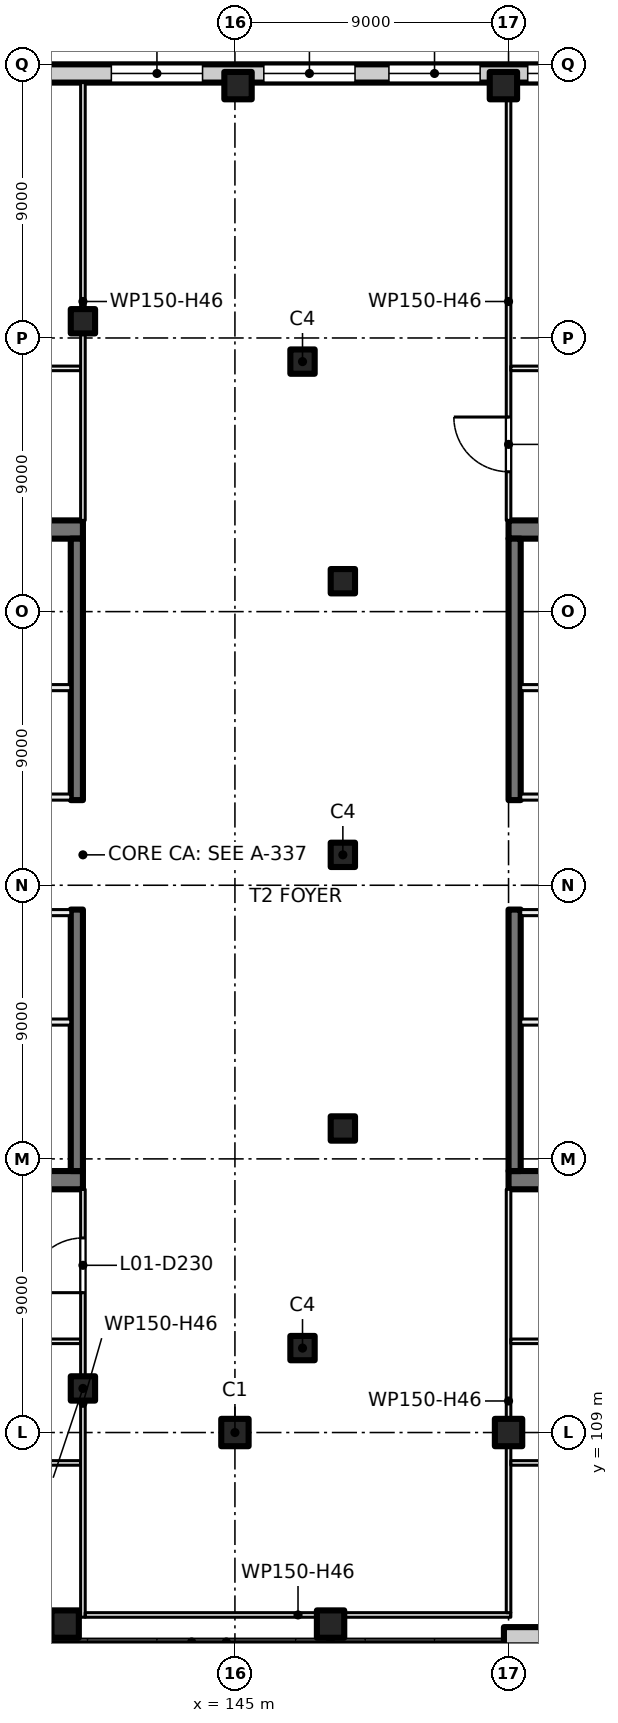
"""IFC4 building model, lengths in metres.
Left out: names, types, materials, properties, quantities, classifications, styles, units other than length and angle.
Written with IfcOpenShell. Run it as: python <this file> out.ifc"""

import sys

from ifc_helpers import new_model, si_unit, direction, frame, frame_2d, origin, origin_2d, place, context, subcontext, project, spatial, rectangle, extrude, element, fill, save


model = new_model("IFC4")
c1 = context("Model", 3, precision=1e-05, world=origin(), true_north=direction((0.0, 1.0)))
c2 = subcontext(c1, "Body", "Model", "MODEL_VIEW")
j1 = project(units=[si_unit("LENGTHUNIT", "METRE"), si_unit("PLANEANGLEUNIT", "RADIAN")], contexts=[c1])
p1 = place(None, origin())
s1 = spatial("IfcSite", under=j1, at=p1, CompositionType="ELEMENT")
p2 = place(p1, origin())
s2 = spatial("IfcBuilding", under=s1, at=p2, CompositionType="ELEMENT")
p3 = place(p2, frame((0.0, 0.0, 7.5)))
s3 = spatial("IfcBuildingStorey", under=s2, at=p3, CompositionType="ELEMENT", Elevation=7.5)
for number, where, z_axis, x_axis in (
    (1, (145.0, 109.0, 0.0), (0.0, 0.0, 1.0), (1.0, 0.0, 0.0)),
    (2, (154.0, 109.0, 0.0), (0.0, 0.0, 1.0), (1.0, 0.0, 0.0)),
    (3, (145.102, 153.3, 0.0), (0.0, 0.0, 1.0), (1.0, 0.0, 0.0)),
    (4, (153.831, 153.3, 0.0), (0.0, 0.0, 1.0), (1.0, 0.0, 0.0)),
    (5, (148.146, 102.7, 0.0), (0.0, 0.0, 1.0), (1.0, 0.0, 0.0)),
    (6, (139.416, 102.7, 0.0), (0.0, 0.0, 1.0), (1.0, 0.0, 0.0)),
):
    element("IfcColumn", number, at=place(p3, frame(where, z_axis=z_axis, x_axis=x_axis)), inside=s3, PredefinedType="COLUMN", context=c2, shape_type="SweptSolid", body=[
        extrude(rectangle(XDim=0.9, YDim=0.9, at=origin_2d()), origin(), (0.0, 0.0, 1.0), 5.0),
    ])
for number, where, z_axis, x_axis in (
    (7, (148.55, 119.0, 0.0), (0.0, 0.0, 1.0), (1.0, 0.0, 0.0)),
    (8, (148.55, 128.0, 0.0), (0.0, 0.0, 1.0), (1.0, 0.0, 0.0)),
    (9, (148.55, 137.0, 0.0), (0.0, 0.0, 1.0), (1.0, 0.0, 0.0)),
    (10, (140.0, 145.55, 0.0), (0.0, 0.0, 1.0), (1.0, 0.0, 0.0)),
    (11, (147.223, 144.223, 0.0), (0.0, 0.0, 1.0), (1.0, 0.0, 0.0)),
    (12, (140.0, 110.45, 0.0), (0.0, 0.0, 1.0), (1.0, 0.0, 0.0)),
    (13, (147.223, 111.777, 0.0), (0.0, 0.0, 1.0), (1.0, 0.0, 0.0)),
):
    element("IfcColumn", number, at=place(p3, frame(where, z_axis=z_axis, x_axis=x_axis)), inside=s3, PredefinedType="COLUMN", context=c2, shape_type="SweptSolid", body=[
        extrude(rectangle(XDim=0.8, YDim=0.8, at=origin_2d()), origin(), (0.0, 0.0, 1.0), 5.0),
    ])
for number, where, z_axis, x_axis in (
    (14, (135.4, 117.3, 0.0), (0.0, 0.0, 1.0), (1.0, 0.0, 0.0)),
    (15, (135.4, 138.7, 0.0), (0.0, 0.0, 1.0), (1.0, 0.0, 0.0)),
):
    element("IfcWall", number, at=place(p3, frame(where, z_axis=z_axis, x_axis=x_axis)), inside=s3, PredefinedType="SHEAR", context=c2, shape_type="SweptSolid", body=[
        extrude(rectangle(XDim=4.6, YDim=0.6, at=frame_2d((2.3, 0.0))), origin(), (0.0, 0.0, 1.0), 5.0),
    ])
for number, where, z_axis, x_axis in (
    (16, (139.8, 117.6, 0.0), (0.0, 0.0, 1.0), (0.0, 1.0, 0.0)),
    (17, (139.8, 129.8, 0.0), (0.0, 0.0, 1.0), (0.0, 1.0, 0.0)),
):
    element("IfcWall", number, at=place(p3, frame(where, z_axis=z_axis, x_axis=x_axis)), inside=s3, PredefinedType="SHEAR", context=c2, shape_type="SweptSolid", body=[
        extrude(rectangle(XDim=8.6, YDim=0.4, at=frame_2d((4.3, 0.0))), origin(), (0.0, 0.0, 1.0), 5.0),
    ])
for number, where, z_axis, x_axis in (
    (18, (158.6, 138.7, 0.0), (0.0, 0.0, 1.0), (-1.0, 0.0, 0.0)),
    (19, (158.6, 117.3, 0.0), (0.0, 0.0, 1.0), (-1.0, 0.0, 0.0)),
):
    element("IfcWall", number, at=place(p3, frame(where, z_axis=z_axis, x_axis=x_axis)), inside=s3, PredefinedType="SHEAR", context=c2, shape_type="SweptSolid", body=[
        extrude(rectangle(XDim=4.6, YDim=0.6, at=frame_2d((2.3, 0.0))), origin(), (0.0, 0.0, 1.0), 5.0),
    ])
for number, where, z_axis, x_axis in (
    (20, (154.2, 138.4, 0.0), (0.0, 0.0, 1.0), (0.0, -1.0, 0.0)),
    (21, (154.2, 126.2, 0.0), (0.0, 0.0, 1.0), (0.0, -1.0, 0.0)),
):
    element("IfcWall", number, at=place(p3, frame(where, z_axis=z_axis, x_axis=x_axis)), inside=s3, PredefinedType="SHEAR", context=c2, shape_type="SweptSolid", body=[
        extrude(rectangle(XDim=8.6, YDim=0.4, at=frame_2d((4.3, 0.0))), origin(), (0.0, 0.0, 1.0), 5.0),
    ])
p4 = place(p3, frame((162.978, 102.3, 0.0), z_axis=(0.0, 0.0, 1.0), x_axis=(-1.0, 0.0, 0.0)))
e22 = element("IfcWall", 22, at=p4, inside=s3, PredefinedType="SOLIDWALL", context=c2, shape_type="SweptSolid", body=[
    extrude(rectangle(XDim=9.13, YDim=0.6, at=frame_2d((4.565, 0.0))), origin(), (0.0, 0.0, 1.0), 4.6),
])
p5 = place(p4, frame((0.783, 0.0, 0.9)))
e23 = element("IfcOpeningElement", 23, at=p5, cuts=e22, PredefinedType="OPENING", context=c2, shape_type="SweptSolid", body=[
    extrude(rectangle(XDim=3.0, YDim=3.0, at=frame_2d((1.5, 1.5))), frame((0.0, 0.31, 0.0), z_axis=(0.0, -1.0, 0.0), x_axis=(1.0, 0.0, 0.0)), (0.0, 0.0, 1.0), 0.62),
])
p6 = place(p3, frame((131.022, 153.7, 0.0), z_axis=(0.0, 0.0, 1.0), x_axis=(1.0, 0.0, 0.0)))
e24 = element("IfcWall", 24, at=p6, inside=s3, PredefinedType="SOLIDWALL", context=c2, shape_type="SweptSolid", body=[
    extrude(rectangle(XDim=31.957, YDim=0.6, at=frame_2d((15.978, 0.0))), origin(), (0.0, 0.0, 1.0), 4.6),
])
p7 = place(p6, frame((0.783, 0.0, 0.9)))
e25 = element("IfcOpeningElement", 25, at=p7, cuts=e24, PredefinedType="OPENING", context=c2, shape_type="SweptSolid", body=[
    extrude(rectangle(XDim=3.0, YDim=3.0, at=frame_2d((1.5, 1.5))), frame((0.0, 0.31, 0.0), z_axis=(0.0, -1.0, 0.0), x_axis=(1.0, 0.0, 0.0)), (0.0, 0.0, 1.0), 0.62),
])
p8 = place(p6, frame((9.913, 0.0, 0.9)))
e26 = element("IfcOpeningElement", 26, at=p8, cuts=e24, PredefinedType="OPENING", context=c2, shape_type="SweptSolid", body=[
    extrude(rectangle(XDim=3.0, YDim=3.0, at=frame_2d((1.5, 1.5))), frame((0.0, 0.31, 0.0), z_axis=(0.0, -1.0, 0.0), x_axis=(1.0, 0.0, 0.0)), (0.0, 0.0, 1.0), 0.62),
])
p9 = place(p6, frame((14.928, 0.0, 0.9)))
e27 = element("IfcOpeningElement", 27, at=p9, cuts=e24, PredefinedType="OPENING", context=c2, shape_type="SweptSolid", body=[
    extrude(rectangle(XDim=3.0, YDim=3.0, at=frame_2d((1.5, 1.5))), frame((0.0, 0.31, 0.0), z_axis=(0.0, -1.0, 0.0), x_axis=(1.0, 0.0, 0.0)), (0.0, 0.0, 1.0), 0.62),
])
p10 = place(p6, frame((19.043, 0.0, 0.9)))
e28 = element("IfcOpeningElement", 28, at=p10, cuts=e24, PredefinedType="OPENING", context=c2, shape_type="SweptSolid", body=[
    extrude(rectangle(XDim=3.0, YDim=3.0, at=frame_2d((1.5, 1.5))), frame((0.0, 0.31, 0.0), z_axis=(0.0, -1.0, 0.0), x_axis=(1.0, 0.0, 0.0)), (0.0, 0.0, 1.0), 0.62),
])
p11 = place(p6, frame((23.609, 0.0, 0.9)))
e29 = element("IfcOpeningElement", 29, at=p11, cuts=e24, PredefinedType="OPENING", context=c2, shape_type="SweptSolid", body=[
    extrude(rectangle(XDim=3.0, YDim=3.0, at=frame_2d((1.5, 1.5))), frame((0.0, 0.31, 0.0), z_axis=(0.0, -1.0, 0.0), x_axis=(1.0, 0.0, 0.0)), (0.0, 0.0, 1.0), 0.62),
])
p12 = place(p6, frame((27.724, 0.0, 0.9)))
e30 = element("IfcOpeningElement", 30, at=p12, cuts=e24, PredefinedType="OPENING", context=c2, shape_type="SweptSolid", body=[
    extrude(rectangle(XDim=3.0, YDim=3.0, at=frame_2d((1.5, 1.5))), frame((0.0, 0.31, 0.0), z_axis=(0.0, -1.0, 0.0), x_axis=(1.0, 0.0, 0.0)), (0.0, 0.0, 1.0), 0.62),
])
p13 = place(p3, frame((135.0, 129.9, 0.0), z_axis=(0.0, 0.0, 1.0), x_axis=(1.0, 0.0, 0.0)))
e31 = element("IfcWall", 31, at=p13, inside=s3, PredefinedType="PARTITIONING", context=c2, shape_type="SweptSolid", body=[
    extrude(rectangle(XDim=4.6, YDim=0.2, at=frame_2d((2.3, 0.0))), origin(), (0.0, 0.0, 1.0), 4.6),
])
p14 = place(p13, frame((1.7, 0.0, 0.0)))
e32 = element("IfcOpeningElement", 32, at=p14, cuts=e31, PredefinedType="OPENING", context=c2, shape_type="SweptSolid", body=[
    extrude(rectangle(XDim=1.2, YDim=2.1, at=frame_2d((0.6, 1.05))), frame((0.0, 0.11, 0.0), z_axis=(0.0, -1.0, 0.0), x_axis=(1.0, 0.0, 0.0)), (0.0, 0.0, 1.0), 0.22),
])
p15 = place(p3, frame((135.0, 133.5, 0.0), z_axis=(0.0, 0.0, 1.0), x_axis=(1.0, 0.0, 0.0)))
e33 = element("IfcWall", 33, at=p15, inside=s3, PredefinedType="PARTITIONING", context=c2, shape_type="SweptSolid", body=[
    extrude(rectangle(XDim=4.6, YDim=0.2, at=frame_2d((2.3, 0.0))), origin(), (0.0, 0.0, 1.0), 4.6),
])
p16 = place(p15, frame((1.75, 0.0, 0.0)))
e34 = element("IfcOpeningElement", 34, at=p16, cuts=e33, PredefinedType="OPENING", context=c2, shape_type="SweptSolid", body=[
    extrude(rectangle(XDim=1.5, YDim=2.1, at=frame_2d((0.75, 1.05))), frame((0.0, 0.11, 0.0), z_axis=(0.0, -1.0, 0.0), x_axis=(1.0, 0.0, 0.0)), (0.0, 0.0, 1.0), 0.22),
])
p17 = place(p3, frame((139.6, 126.1, 0.0), z_axis=(0.0, 0.0, 1.0), x_axis=(-1.0, 0.0, 0.0)))
e35 = element("IfcWall", 35, at=p17, inside=s3, PredefinedType="PARTITIONING", context=c2, shape_type="SweptSolid", body=[
    extrude(rectangle(XDim=4.6, YDim=0.2, at=frame_2d((2.3, 0.0))), origin(), (0.0, 0.0, 1.0), 4.6),
])
p18 = place(p17, frame((1.7, 0.0, 0.0)))
e36 = element("IfcOpeningElement", 36, at=p18, cuts=e35, PredefinedType="OPENING", context=c2, shape_type="SweptSolid", body=[
    extrude(rectangle(XDim=1.2, YDim=2.1, at=frame_2d((0.6, 1.05))), frame((0.0, 0.11, 0.0), z_axis=(0.0, -1.0, 0.0), x_axis=(1.0, 0.0, 0.0)), (0.0, 0.0, 1.0), 0.22),
])
p19 = place(p3, frame((139.6, 122.5, 0.0), z_axis=(0.0, 0.0, 1.0), x_axis=(-1.0, 0.0, 0.0)))
e37 = element("IfcWall", 37, at=p19, inside=s3, PredefinedType="PARTITIONING", context=c2, shape_type="SweptSolid", body=[
    extrude(rectangle(XDim=4.6, YDim=0.2, at=frame_2d((2.3, 0.0))), origin(), (0.0, 0.0, 1.0), 4.6),
])
p20 = place(p19, frame((1.35, 0.0, 0.0)))
e38 = element("IfcOpeningElement", 38, at=p20, cuts=e37, PredefinedType="OPENING", context=c2, shape_type="SweptSolid", body=[
    extrude(rectangle(XDim=1.5, YDim=2.1, at=frame_2d((0.75, 1.05))), frame((0.0, 0.11, 0.0), z_axis=(0.0, -1.0, 0.0), x_axis=(1.0, 0.0, 0.0)), (0.0, 0.0, 1.0), 0.22),
])
p21 = place(p3, frame((163.8, 126.1, 0.0), z_axis=(0.0, 0.0, 1.0), x_axis=(-1.0, 0.0, 0.0)))
e39 = element("IfcWall", 39, at=p21, inside=s3, PredefinedType="PARTITIONING", context=c2, shape_type="SweptSolid", body=[
    extrude(rectangle(XDim=9.4, YDim=0.2, at=frame_2d((4.7, 0.0))), origin(), (0.0, 0.0, 1.0), 4.6),
])
p22 = place(p21, frame((4.1, 0.0, 0.0)))
e40 = element("IfcOpeningElement", 40, at=p22, cuts=e39, PredefinedType="OPENING", context=c2, shape_type="SweptSolid", body=[
    extrude(rectangle(XDim=1.2, YDim=2.1, at=frame_2d((0.6, 1.05))), frame((0.0, 0.11, 0.0), z_axis=(0.0, -1.0, 0.0), x_axis=(1.0, 0.0, 0.0)), (0.0, 0.0, 1.0), 0.22),
])
p23 = place(p3, frame((163.8, 122.5, 0.0), z_axis=(0.0, 0.0, 1.0), x_axis=(-1.0, 0.0, 0.0)))
e41 = element("IfcWall", 41, at=p23, inside=s3, PredefinedType="PARTITIONING", context=c2, shape_type="SweptSolid", body=[
    extrude(rectangle(XDim=9.4, YDim=0.2, at=frame_2d((4.7, 0.0))), origin(), (0.0, 0.0, 1.0), 4.6),
])
p24 = place(p23, frame((6.55, 0.0, 0.0)))
e42 = element("IfcOpeningElement", 42, at=p24, cuts=e41, PredefinedType="OPENING", context=c2, shape_type="SweptSolid", body=[
    extrude(rectangle(XDim=1.5, YDim=2.1, at=frame_2d((0.75, 1.05))), frame((0.0, 0.11, 0.0), z_axis=(0.0, -1.0, 0.0), x_axis=(1.0, 0.0, 0.0)), (0.0, 0.0, 1.0), 0.22),
])
p25 = place(p3, frame((154.4, 129.9, 0.0), z_axis=(0.0, 0.0, 1.0), x_axis=(1.0, 0.0, 0.0)))
e43 = element("IfcWall", 43, at=p25, inside=s3, PredefinedType="PARTITIONING", context=c2, shape_type="SweptSolid", body=[
    extrude(rectangle(XDim=9.4, YDim=0.2, at=frame_2d((4.7, 0.0))), origin(), (0.0, 0.0, 1.0), 4.6),
])
p26 = place(p25, frame((4.1, 0.0, 0.0)))
e44 = element("IfcOpeningElement", 44, at=p26, cuts=e43, PredefinedType="OPENING", context=c2, shape_type="SweptSolid", body=[
    extrude(rectangle(XDim=1.2, YDim=2.1, at=frame_2d((0.6, 1.05))), frame((0.0, 0.11, 0.0), z_axis=(0.0, -1.0, 0.0), x_axis=(1.0, 0.0, 0.0)), (0.0, 0.0, 1.0), 0.22),
])
p27 = place(p3, frame((154.4, 133.5, 0.0), z_axis=(0.0, 0.0, 1.0), x_axis=(1.0, 0.0, 0.0)))
e45 = element("IfcWall", 45, at=p27, inside=s3, PredefinedType="PARTITIONING", context=c2, shape_type="SweptSolid", body=[
    extrude(rectangle(XDim=9.4, YDim=0.2, at=frame_2d((4.7, 0.0))), origin(), (0.0, 0.0, 1.0), 4.6),
])
p28 = place(p27, frame((1.35, 0.0, 0.0)))
e46 = element("IfcOpeningElement", 46, at=p28, cuts=e45, PredefinedType="OPENING", context=c2, shape_type="SweptSolid", body=[
    extrude(rectangle(XDim=1.5, YDim=2.1, at=frame_2d((0.75, 1.05))), frame((0.0, 0.11, 0.0), z_axis=(0.0, -1.0, 0.0), x_axis=(1.0, 0.0, 0.0)), (0.0, 0.0, 1.0), 0.22),
])
p29 = place(p3, frame((119.875, 144.0, 0.0), z_axis=(0.0, 0.0, 1.0), x_axis=(1.0, 0.0, 0.0)))
e47 = element("IfcWall", 47, at=p29, inside=s3, PredefinedType="PARTITIONING", context=c2, shape_type="SweptSolid", body=[
    extrude(rectangle(XDim=20.05, YDim=0.15, at=frame_2d((10.025, 0.0))), origin(), (0.0, 0.0, 1.0), 4.6),
])
p30 = place(p29, frame((13.125, 0.0, 0.0)))
e48 = element("IfcOpeningElement", 48, at=p30, cuts=e47, PredefinedType="OPENING", context=c2, shape_type="SweptSolid", body=[
    extrude(rectangle(XDim=1.0, YDim=2.1, at=frame_2d((0.5, 1.05))), frame((0.0, 0.085, 0.0), z_axis=(0.0, -1.0, 0.0), x_axis=(1.0, 0.0, 0.0)), (0.0, 0.0, 1.0), 0.17),
])
p31 = place(p3, frame((121.368, 108.0, 0.0), z_axis=(0.0, 0.0, 1.0), x_axis=(1.0, 0.0, 0.0)))
e49 = element("IfcWall", 49, at=p31, inside=s3, PredefinedType="PARTITIONING", context=c2, shape_type="SweptSolid", body=[
    extrude(rectangle(XDim=18.557, YDim=0.15, at=frame_2d((9.279, 0.0))), origin(), (0.0, 0.0, 1.0), 4.6),
])
p32 = place(p3, frame((139.925, 112.0, 0.0), z_axis=(0.0, 0.0, 1.0), x_axis=(-1.0, 0.0, 0.0)))
e50 = element("IfcWall", 50, at=p32, inside=s3, PredefinedType="PARTITIONING", context=c2, shape_type="SweptSolid", body=[
    extrude(rectangle(XDim=12.927, YDim=0.15, at=frame_2d((6.463, 0.0))), origin(), (0.0, 0.0, 1.0), 4.6),
])
p33 = place(p32, frame((5.925, 0.0, 0.0)))
e51 = element("IfcOpeningElement", 51, at=p33, cuts=e50, PredefinedType="OPENING", context=c2, shape_type="SweptSolid", body=[
    extrude(rectangle(XDim=1.0, YDim=2.1, at=frame_2d((0.5, 1.05))), frame((0.0, 0.085, 0.0), z_axis=(0.0, -1.0, 0.0), x_axis=(1.0, 0.0, 0.0)), (0.0, 0.0, 1.0), 0.17),
])
p34 = place(p3, frame((140.0, 102.925, 0.0), z_axis=(0.0, 0.0, 1.0), x_axis=(0.0, 1.0, 0.0)))
e52 = element("IfcWall", 52, at=p34, inside=s3, PredefinedType="PARTITIONING", context=c2, shape_type="SweptSolid", body=[
    extrude(rectangle(XDim=14.075, YDim=0.15, at=frame_2d((7.038, 0.0))), origin(), (0.0, 0.0, 1.0), 4.6),
])
p35 = place(p34, frame((10.675, 0.0, 0.0)))
e53 = element("IfcOpeningElement", 53, at=p35, cuts=e52, PredefinedType="OPENING", context=c2, shape_type="SweptSolid", body=[
    extrude(rectangle(XDim=1.8, YDim=2.1, at=frame_2d((0.9, 1.05))), frame((0.0, 0.085, 0.0), z_axis=(0.0, -1.0, 0.0), x_axis=(1.0, 0.0, 0.0)), (0.0, 0.0, 1.0), 0.17),
])
p36 = place(p3, frame((140.075, 103.0, 0.0), z_axis=(0.0, 0.0, 1.0), x_axis=(1.0, 0.0, 0.0)))
e54 = element("IfcWall", 54, at=p36, inside=s3, PredefinedType="PARTITIONING", context=c2, shape_type="SweptSolid", body=[
    extrude(rectangle(XDim=14.0, YDim=0.15, at=frame_2d((7.0, 0.0))), origin(), (0.0, 0.0, 1.0), 4.6),
])
p37 = place(p3, frame((140.0, 139.0, 0.0), z_axis=(0.0, 0.0, 1.0), x_axis=(0.0, 1.0, 0.0)))
e55 = element("IfcWall", 55, at=p37, inside=s3, PredefinedType="PARTITIONING", context=c2, shape_type="SweptSolid", body=[
    extrude(rectangle(XDim=14.4, YDim=0.15, at=frame_2d((7.2, 0.0))), origin(), (0.0, 0.0, 1.0), 4.6),
])
p38 = place(p3, frame((154.0, 103.075, 0.0), z_axis=(0.0, 0.0, 1.0), x_axis=(0.0, 1.0, 0.0)))
e56 = element("IfcWall", 56, at=p38, inside=s3, PredefinedType="PARTITIONING", context=c2, shape_type="SweptSolid", body=[
    extrude(rectangle(XDim=13.925, YDim=0.15, at=frame_2d((6.962, 0.0))), origin(), (0.0, 0.0, 1.0), 4.6),
])
p39 = place(p3, frame((154.075, 108.0, 0.0), z_axis=(0.0, 0.0, 1.0), x_axis=(1.0, 0.0, 0.0)))
e57 = element("IfcWall", 57, at=p39, inside=s3, PredefinedType="PARTITIONING", context=c2, shape_type="SweptSolid", body=[
    extrude(rectangle(XDim=18.557, YDim=0.15, at=frame_2d((9.279, 0.0))), origin(), (0.0, 0.0, 1.0), 4.6),
])
p40 = place(p3, frame((167.002, 112.0, 0.0), z_axis=(0.0, 0.0, 1.0), x_axis=(-1.0, 0.0, 0.0)))
e58 = element("IfcWall", 58, at=p40, inside=s3, PredefinedType="PARTITIONING", context=c2, shape_type="SweptSolid", body=[
    extrude(rectangle(XDim=12.927, YDim=0.15, at=frame_2d((6.463, 0.0))), origin(), (0.0, 0.0, 1.0), 4.6),
])
p41 = place(p40, frame((7.5, 0.0, 0.0)))
e59 = element("IfcOpeningElement", 59, at=p41, cuts=e58, PredefinedType="OPENING", context=c2, shape_type="SweptSolid", body=[
    extrude(rectangle(XDim=1.0, YDim=2.1, at=frame_2d((0.5, 1.05))), frame((0.0, 0.085, 0.0), z_axis=(0.0, -1.0, 0.0), x_axis=(1.0, 0.0, 0.0)), (0.0, 0.0, 1.0), 0.17),
])
p42 = place(p3, frame((154.0, 153.4, 0.0), z_axis=(0.0, 0.0, 1.0), x_axis=(0.0, -1.0, 0.0)))
e60 = element("IfcWall", 60, at=p42, inside=s3, PredefinedType="PARTITIONING", context=c2, shape_type="SweptSolid", body=[
    extrude(rectangle(XDim=14.4, YDim=0.15, at=frame_2d((7.2, 0.0))), origin(), (0.0, 0.0, 1.0), 4.6),
])
p43 = place(p42, frame((11.0, 0.0, 0.0)))
e61 = element("IfcOpeningElement", 61, at=p43, cuts=e60, PredefinedType="OPENING", context=c2, shape_type="SweptSolid", body=[
    extrude(rectangle(XDim=1.8, YDim=2.1, at=frame_2d((0.9, 1.05))), frame((0.0, 0.085, 0.0), z_axis=(0.0, -1.0, 0.0), x_axis=(1.0, 0.0, 0.0)), (0.0, 0.0, 1.0), 0.17),
])
p44 = place(p3, frame((154.075, 144.0, 0.0), z_axis=(0.0, 0.0, 1.0), x_axis=(1.0, 0.0, 0.0)))
e62 = element("IfcWall", 62, at=p44, inside=s3, PredefinedType="PARTITIONING", context=c2, shape_type="SweptSolid", body=[
    extrude(rectangle(XDim=20.05, YDim=0.15, at=frame_2d((10.025, 0.0))), origin(), (0.0, 0.0, 1.0), 4.6),
])
p45 = place(p44, frame((2.427, 0.0, 0.0)))
e63 = element("IfcOpeningElement", 63, at=p45, cuts=e62, PredefinedType="OPENING", context=c2, shape_type="SweptSolid", body=[
    extrude(rectangle(XDim=1.0, YDim=2.1, at=frame_2d((0.5, 1.05))), frame((0.0, 0.085, 0.0), z_axis=(0.0, -1.0, 0.0), x_axis=(1.0, 0.0, 0.0)), (0.0, 0.0, 1.0), 0.17),
])
p46 = place(p44, frame((9.623, 0.0, 0.0)))
e64 = element("IfcOpeningElement", 64, at=p46, cuts=e62, PredefinedType="OPENING", context=c2, shape_type="SweptSolid", body=[
    extrude(rectangle(XDim=1.0, YDim=2.1, at=frame_2d((0.5, 1.05))), frame((0.0, 0.085, 0.0), z_axis=(0.0, -1.0, 0.0), x_axis=(1.0, 0.0, 0.0)), (0.0, 0.0, 1.0), 0.17),
])
p47 = place(p8, origin())
e65 = element("IfcWindow", 65, at=p47, inside=s3, PartitioningType="SINGLE_PANEL", PredefinedType="WINDOW", context=c2, shape_type="SweptSolid", body=[
    extrude(rectangle(XDim=3.0, YDim=3.0, at=frame_2d((1.5, 1.5))), frame((0.0, 0.03, 0.0), z_axis=(0.0, -1.0, 0.0), x_axis=(1.0, 0.0, 0.0)), (0.0, 0.0, 1.0), 0.06),
])
fill(e26, e65)
p48 = place(p9, origin())
e66 = element("IfcWindow", 66, at=p48, inside=s3, PartitioningType="SINGLE_PANEL", PredefinedType="WINDOW", context=c2, shape_type="SweptSolid", body=[
    extrude(rectangle(XDim=3.0, YDim=3.0, at=frame_2d((1.5, 1.5))), frame((0.0, 0.03, 0.0), z_axis=(0.0, -1.0, 0.0), x_axis=(1.0, 0.0, 0.0)), (0.0, 0.0, 1.0), 0.06),
])
fill(e27, e66)
p49 = place(p10, origin())
e67 = element("IfcWindow", 67, at=p49, inside=s3, PartitioningType="SINGLE_PANEL", PredefinedType="WINDOW", context=c2, shape_type="SweptSolid", body=[
    extrude(rectangle(XDim=3.0, YDim=3.0, at=frame_2d((1.5, 1.5))), frame((0.0, 0.03, 0.0), z_axis=(0.0, -1.0, 0.0), x_axis=(1.0, 0.0, 0.0)), (0.0, 0.0, 1.0), 0.06),
])
fill(e28, e67)
p50 = place(p11, origin())
e68 = element("IfcWindow", 68, at=p50, inside=s3, PartitioningType="SINGLE_PANEL", PredefinedType="WINDOW", context=c2, shape_type="SweptSolid", body=[
    extrude(rectangle(XDim=3.0, YDim=3.0, at=frame_2d((1.5, 1.5))), frame((0.0, 0.03, 0.0), z_axis=(0.0, -1.0, 0.0), x_axis=(1.0, 0.0, 0.0)), (0.0, 0.0, 1.0), 0.06),
])
fill(e29, e68)
p51 = place(p35, origin())
e69 = element("IfcDoor", 69, at=p51, inside=s3, OperationType="DOUBLE_DOOR_SINGLE_SWING", PredefinedType="DOOR", context=c2, shape_type="SweptSolid", body=[
    extrude(rectangle(XDim=1.8, YDim=2.1, at=frame_2d((0.9, 1.05))), frame((0.0, 0.025, 0.0), z_axis=(0.0, -1.0, 0.0), x_axis=(1.0, 0.0, 0.0)), (0.0, 0.0, 1.0), 0.05),
])
fill(e53, e69)
p52 = place(p43, origin())
e70 = element("IfcDoor", 70, at=p52, inside=s3, OperationType="DOUBLE_DOOR_SINGLE_SWING", PredefinedType="DOOR", context=c2, shape_type="SweptSolid", body=[
    extrude(rectangle(XDim=1.8, YDim=2.1, at=frame_2d((0.9, 1.05))), frame((0.0, 0.025, 0.0), z_axis=(0.0, -1.0, 0.0), x_axis=(1.0, 0.0, 0.0)), (0.0, 0.0, 1.0), 0.05),
])
fill(e61, e70)
save(model, sys.argv[1])
